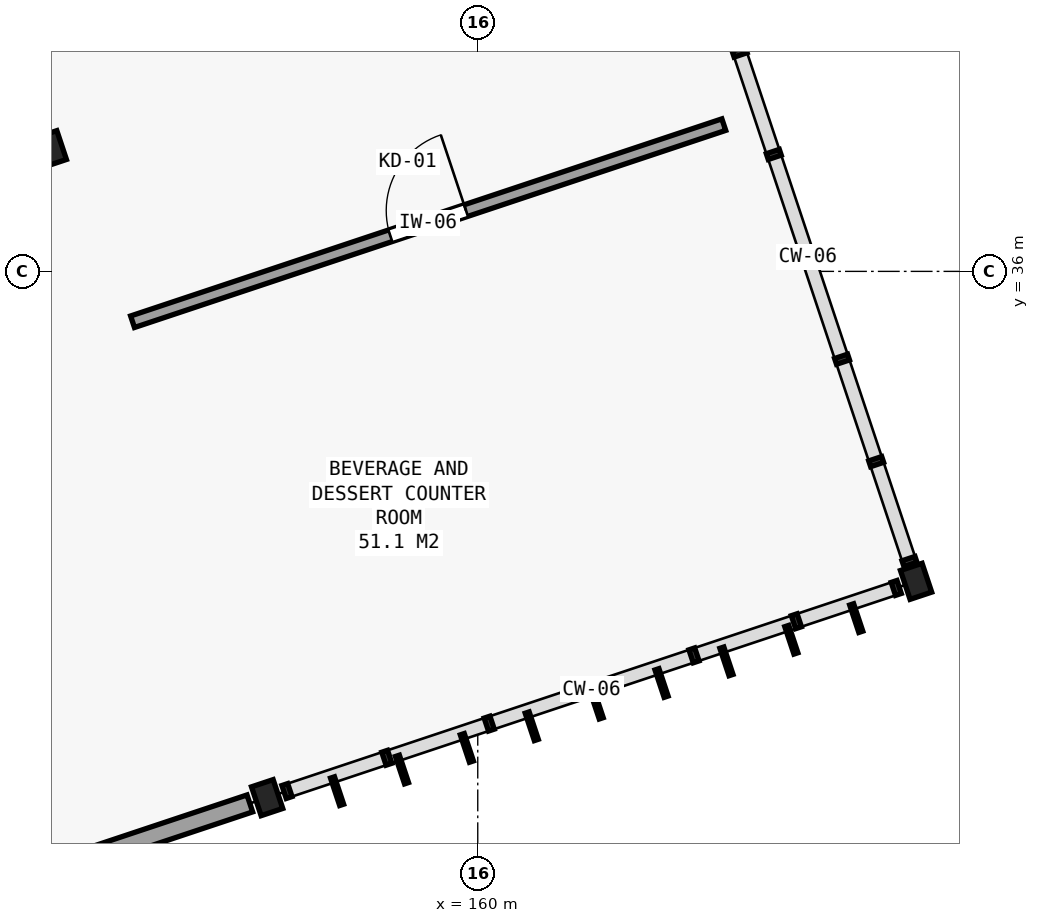
"""IFC4 building model, lengths in metres.
Left out: names, types, materials, properties, quantities, classifications, styles, units other than length and angle.
Written with IfcOpenShell. Run it as: python <this file> out.ifc"""

import sys

from ifc_helpers import new_model, si_unit, direction, frame, frame_2d, origin, origin_2d, place, context, subcontext, project, spatial, rectangle, i_section, extrude, element, fill, save


model = new_model("IFC4")
c1 = context("Model", 3, precision=1e-05, world=origin(), true_north=direction((0.0, 1.0)))
c2 = subcontext(c1, "Body", "Model", "MODEL_VIEW")
j1 = project(units=[si_unit("LENGTHUNIT", "METRE"), si_unit("PLANEANGLEUNIT", "RADIAN")], contexts=[c1])
p1 = place(None, origin())
s1 = spatial("IfcSite", under=j1, at=p1, CompositionType="ELEMENT")
p2 = place(p1, origin())
s2 = spatial("IfcBuilding", under=s1, at=p2, CompositionType="ELEMENT")
p3 = place(p2, frame((0.0, 0.0, 5.4)))
s3 = spatial("IfcBuildingStorey", under=s2, at=p3, CompositionType="ELEMENT", Elevation=5.4)
for number, where, z_axis, x_axis in (
    (1, (157.229, 29.076, 0.0), (0.0, 0.0, 1.0), (0.949, 0.316, 0.0)),
    (2, (154.383, 37.615, 0.0), (0.0, 0.0, 1.0), (0.949, 0.316, 0.0)),
    (3, (165.767, 31.922, 0.0), (0.0, 0.0, 1.0), (0.949, 0.316, 0.0)),
):
    element("IfcColumn", number, at=place(p3, frame(where, z_axis=z_axis, x_axis=x_axis)), inside=s3, PredefinedType="COLUMN", context=c2, shape_type="SweptSolid", body=[
        extrude(i_section(OverallWidth=0.3, OverallDepth=0.4, WebThickness=0.013, FlangeThickness=0.024, FilletRadius=0.027, at=origin_2d()), origin(), (0.0, 0.0, 1.0), 4.5),
    ])
p4 = place(p3, frame((157.001, 29.0, 0.0), z_axis=(0.0, 0.0, 1.0), x_axis=(-0.948680432514, -0.316236362498, 0.0)))
e4 = element("IfcWall", 4, at=p4, inside=s3, PredefinedType="SOLIDWALL", context=c2, shape_type="SweptSolid", body=[
    extrude(rectangle(XDim=8.52, YDim=0.235, at=frame_2d((4.26, 0.0))), origin(), (0.0, 0.0, 1.0), 3.775),
])
p5 = place(p4, frame((2.685, 0.0, 1.05)))
e5 = element("IfcOpeningElement", 5, at=p5, cuts=e4, PredefinedType="OPENING", context=c2, shape_type="SweptSolid", body=[
    extrude(rectangle(XDim=3.15, YDim=1.85, at=frame_2d((1.575, 0.925))), frame((0.0, 0.127, 0.0), z_axis=(0.0, -1.0, 0.0), x_axis=(1.0, 0.0, 0.0)), (0.0, 0.0, 1.0), 0.255),
])
p6 = place(p3, frame((144.826, 37.823, 0.0), z_axis=(0.0, 0.0, 1.0), x_axis=(0.948684693125, 0.316223580763, 0.0)))
e6 = element("IfcWall", 6, at=p6, inside=s3, PredefinedType="PARTITIONING", context=c2, shape_type="SweptSolid", body=[
    extrude(rectangle(XDim=17.5, YDim=0.16, at=frame_2d((8.75, 0.0))), origin(), (0.0, 0.0, 1.0), 3.64),
])
p7 = place(p6, frame((13.16, 0.0, 0.0)))
e7 = element("IfcOpeningElement", 7, at=p7, cuts=e6, PredefinedType="OPENING", context=c2, shape_type="SweptSolid", body=[
    extrude(rectangle(XDim=1.05, YDim=2.15, at=frame_2d((0.525, 1.075))), frame((0.0, 0.09, 0.0), z_axis=(0.0, -1.0, 0.0), x_axis=(1.0, 0.0, 0.0)), (0.0, 0.0, 1.0), 0.18),
])
p8 = place(p3, frame((155.458, 35.338, 0.0), z_axis=(0.0, 0.0, 1.0), x_axis=(0.948686275307, 0.316218834108, 0.0)))
e8 = element("IfcWall", 8, at=p8, inside=s3, PredefinedType="PARTITIONING", context=c2, shape_type="SweptSolid", body=[
    extrude(rectangle(XDim=8.2, YDim=0.16, at=frame_2d((4.1, 0.0))), origin(), (0.0, 0.0, 1.0), 3.64),
])
p9 = place(p8, frame((3.575, 0.0, 0.0)))
e9 = element("IfcOpeningElement", 9, at=p9, cuts=e8, PredefinedType="OPENING", context=c2, shape_type="SweptSolid", body=[
    extrude(rectangle(XDim=1.05, YDim=2.15, at=frame_2d((0.525, 1.075))), frame((0.0, 0.09, 0.0), z_axis=(0.0, -1.0, 0.0), x_axis=(1.0, 0.0, 0.0)), (0.0, 0.0, 1.0), 0.18),
])
p10 = place(p9, origin())
e10 = element("IfcDoor", 10, at=p10, inside=s3, OperationType="SINGLE_SWING_RIGHT", PredefinedType="DOOR", context=c2, shape_type="SweptSolid", body=[
    extrude(rectangle(XDim=1.05, YDim=2.15, at=frame_2d((0.525, 1.075))), frame((0.0, 0.025, 0.0), z_axis=(0.0, -1.0, 0.0), x_axis=(1.0, 0.0, 0.0)), (0.0, 0.0, 1.0), 0.05),
])
fill(e9, e10)
save(model, sys.argv[1])
